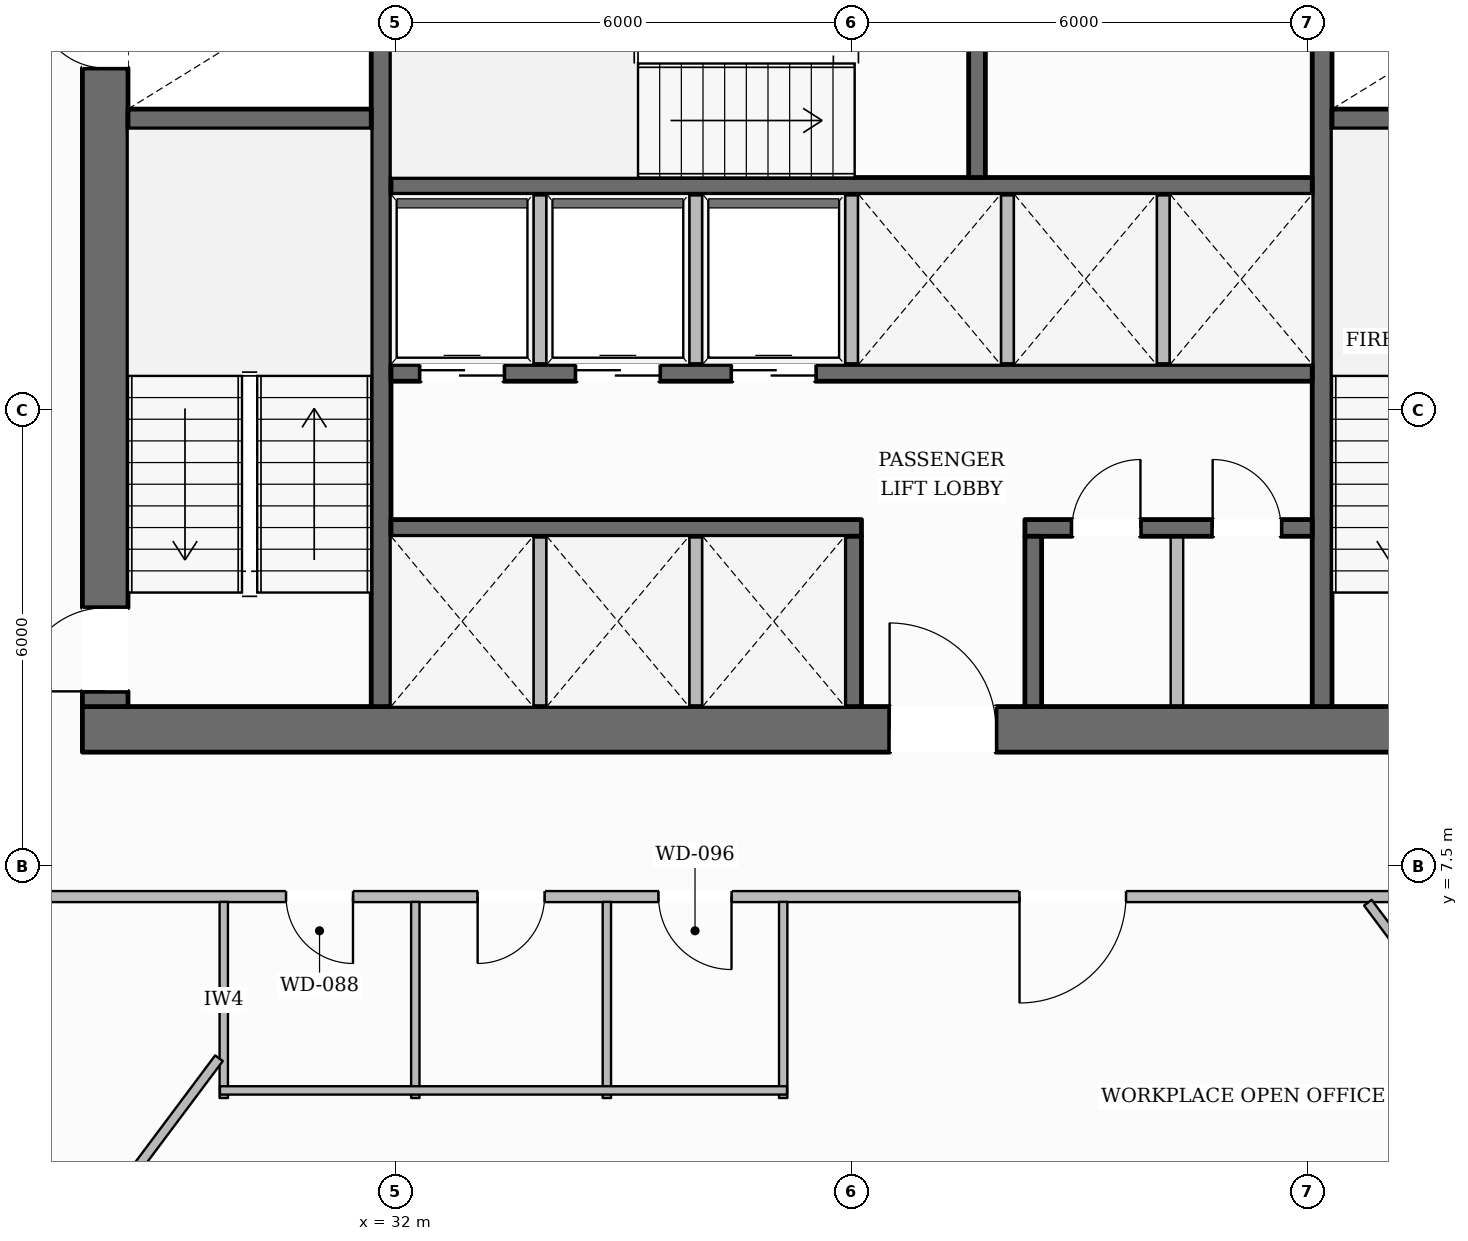
"""IFC4 building model, lengths in metres.
Left out: names, types, materials, properties, quantities, classifications, styles, units other than length and angle.
Written with IfcOpenShell. Run it as: python <this file> out.ifc"""

import sys

from ifc_helpers import new_model, si_unit, direction, frame, frame_2d, origin, place, context, subcontext, project, spatial, rectangle, extrude, element, fill, save


model = new_model("IFC4")
c1 = context("Model", 3, precision=1e-05, world=origin(), true_north=direction((0.0, 1.0)))
c2 = subcontext(c1, "Body", "Model", "MODEL_VIEW")
j1 = project(units=[si_unit("LENGTHUNIT", "METRE"), si_unit("PLANEANGLEUNIT", "RADIAN")], contexts=[c1])
p1 = place(None, origin())
s1 = spatial("IfcSite", under=j1, at=p1, CompositionType="ELEMENT")
p2 = place(p1, origin())
s2 = spatial("IfcBuilding", under=s1, at=p2, CompositionType="ELEMENT")
p3 = place(p2, frame((0.0, 0.0, 25.25)))
s3 = spatial("IfcBuildingStorey", under=s2, at=p3, CompositionType="ELEMENT", Elevation=25.25)
p4 = place(p3, frame((27.88, 9.3, 0.0), z_axis=(0.0, 0.0, 1.0), x_axis=(1.0, 0.0, 0.0)))
e1 = element("IfcWall", 1, at=p4, inside=s3, PredefinedType="SOLIDWALL", context=c2, shape_type="SweptSolid", body=[
    extrude(rectangle(XDim=20.24, YDim=0.6, at=frame_2d((10.12, 0.0))), origin(), (0.0, 0.0, 1.0), 3.59),
])
p5 = place(p4, frame((10.62, 0.0, 0.0)))
e2 = element("IfcOpeningElement", 2, at=p5, cuts=e1, PredefinedType="OPENING", context=c2, shape_type="SweptSolid", body=[
    extrude(rectangle(XDim=1.4, YDim=2.2, at=frame_2d((0.7, 1.1))), frame((0.0, 0.31, 0.0), z_axis=(0.0, -1.0, 0.0), x_axis=(1.0, 0.0, 0.0)), (0.0, 0.0, 1.0), 0.62),
])
p6 = place(p3, frame((28.18, 9.6, 0.0), z_axis=(0.0, 0.0, 1.0), x_axis=(0.0, 1.0, 0.0)))
e3 = element("IfcWall", 3, at=p6, inside=s3, PredefinedType="SOLIDWALL", context=c2, shape_type="SweptSolid", body=[
    extrude(rectangle(XDim=13.0, YDim=0.6, at=frame_2d((6.5, 0.0))), origin(), (0.0, 0.0, 1.0), 3.59),
])
p7 = place(p6, frame((0.2, 0.0, 0.0)))
e4 = element("IfcOpeningElement", 4, at=p7, cuts=e3, PredefinedType="OPENING", context=c2, shape_type="SweptSolid", body=[
    extrude(rectangle(XDim=1.1, YDim=2.15, at=frame_2d((0.55, 1.075))), frame((0.0, 0.31, 0.0), z_axis=(0.0, -1.0, 0.0), x_axis=(1.0, 0.0, 0.0)), (0.0, 0.0, 1.0), 0.62),
])
p8 = place(p6, frame((8.4, 0.0, 0.0)))
e5 = element("IfcOpeningElement", 5, at=p8, cuts=e3, PredefinedType="OPENING", context=c2, shape_type="SweptSolid", body=[
    extrude(rectangle(XDim=0.9, YDim=2.1, at=frame_2d((0.45, 1.05))), frame((0.0, 0.31, 0.0), z_axis=(0.0, -1.0, 0.0), x_axis=(1.0, 0.0, 0.0)), (0.0, 0.0, 1.0), 0.62),
])
p9 = place(p3, frame((31.81, 9.6, 0.0), z_axis=(0.0, 0.0, 1.0), x_axis=(0.0, 1.0, 0.0)))
e6 = element("IfcWall", 6, at=p9, inside=s3, PredefinedType="SHEAR", context=c2, shape_type="SweptSolid", body=[
    extrude(rectangle(XDim=13.0, YDim=0.26, at=frame_2d((6.5, 0.0))), origin(), (0.0, 0.0, 1.0), 3.59),
])
p10 = place(p9, frame((10.925, 0.0, 0.0)))
e7 = element("IfcOpeningElement", 7, at=p10, cuts=e6, PredefinedType="OPENING", context=c2, shape_type="SweptSolid", body=[
    extrude(rectangle(XDim=1.25, YDim=2.25, at=frame_2d((0.625, 1.125))), frame((0.0, 0.14, 0.0), z_axis=(0.0, -1.0, 0.0), x_axis=(1.0, 0.0, 0.0)), (0.0, 0.0, 1.0), 0.28),
])
p11 = place(p3, frame((44.19, 9.6, 0.0), z_axis=(0.0, 0.0, 1.0), x_axis=(0.0, 1.0, 0.0)))
e8 = element("IfcWall", 8, at=p11, inside=s3, PredefinedType="SHEAR", context=c2, shape_type="SweptSolid", body=[
    extrude(rectangle(XDim=13.0, YDim=0.26, at=frame_2d((6.5, 0.0))), origin(), (0.0, 0.0, 1.0), 3.59),
])
p12 = place(p11, frame((10.925, 0.0, 0.0)))
e9 = element("IfcOpeningElement", 9, at=p12, cuts=e8, PredefinedType="OPENING", context=c2, shape_type="SweptSolid", body=[
    extrude(rectangle(XDim=1.25, YDim=2.25, at=frame_2d((0.625, 1.125))), frame((0.0, 0.14, 0.0), z_axis=(0.0, -1.0, 0.0), x_axis=(1.0, 0.0, 0.0)), (0.0, 0.0, 1.0), 0.28),
])
for number, where, z_axis, x_axis in (
    (10, (28.48, 17.33, 0.0), (0.0, 0.0, 1.0), (1.0, 0.0, 0.0)),
    (11, (44.32, 17.33, 0.0), (0.0, 0.0, 1.0), (1.0, 0.0, 0.0)),
):
    element("IfcWall", number, at=place(p3, frame(where, z_axis=z_axis, x_axis=x_axis)), inside=s3, PredefinedType="SHEAR", context=c2, shape_type="SweptSolid", body=[
        extrude(rectangle(XDim=3.2, YDim=0.26, at=frame_2d((1.6, 0.0))), origin(), (0.0, 0.0, 1.0), 3.59),
    ])
p13 = place(p3, frame((31.94, 16.45, 0.0), z_axis=(0.0, 0.0, 1.0), x_axis=(1.0, 0.0, 0.0)))
e12 = element("IfcWall", 12, at=p13, inside=s3, PredefinedType="SOLIDWALL", context=c2, shape_type="SweptSolid", body=[
    extrude(rectangle(XDim=12.12, YDim=0.22, at=frame_2d((6.06, 0.0))), origin(), (0.0, 0.0, 1.0), 3.59),
])
p14 = place(p3, frame((39.65, 16.56, 0.0), z_axis=(0.0, 0.0, 1.0), x_axis=(0.0, 1.0, 0.0)))
e13 = element("IfcWall", 13, at=p14, inside=s3, PredefinedType="SOLIDWALL", context=c2, shape_type="SweptSolid", body=[
    extrude(rectangle(XDim=3.2, YDim=0.22, at=frame_2d((1.6, 0.0))), origin(), (0.0, 0.0, 1.0), 3.59),
])
p15 = place(p3, frame((31.94, 13.99, 0.0), z_axis=(0.0, 0.0, 1.0), x_axis=(1.0, 0.0, 0.0)))
e14 = element("IfcWall", 14, at=p15, inside=s3, PredefinedType="SOLIDWALL", context=c2, shape_type="SweptSolid", body=[
    extrude(rectangle(XDim=12.12, YDim=0.22, at=frame_2d((6.06, 0.0))), origin(), (0.0, 0.0, 1.0), 3.59),
])
p16 = place(p15, frame((0.385, 0.0, 0.0)))
e15 = element("IfcOpeningElement", 15, at=p16, cuts=e14, PredefinedType="OPENING", context=c2, shape_type="SweptSolid", body=[
    extrude(rectangle(XDim=1.1, YDim=2.2, at=frame_2d((0.55, 1.1))), frame((0.0, 0.12, 0.0), z_axis=(0.0, -1.0, 0.0), x_axis=(1.0, 0.0, 0.0)), (0.0, 0.0, 1.0), 0.24),
])
p17 = place(p15, frame((2.435, 0.0, 0.0)))
e16 = element("IfcOpeningElement", 16, at=p17, cuts=e14, PredefinedType="OPENING", context=c2, shape_type="SweptSolid", body=[
    extrude(rectangle(XDim=1.1, YDim=2.2, at=frame_2d((0.55, 1.1))), frame((0.0, 0.12, 0.0), z_axis=(0.0, -1.0, 0.0), x_axis=(1.0, 0.0, 0.0)), (0.0, 0.0, 1.0), 0.24),
])
p18 = place(p15, frame((4.485, 0.0, 0.0)))
e17 = element("IfcOpeningElement", 17, at=p18, cuts=e14, PredefinedType="OPENING", context=c2, shape_type="SweptSolid", body=[
    extrude(rectangle(XDim=1.1, YDim=2.2, at=frame_2d((0.55, 1.1))), frame((0.0, 0.12, 0.0), z_axis=(0.0, -1.0, 0.0), x_axis=(1.0, 0.0, 0.0)), (0.0, 0.0, 1.0), 0.24),
])
p19 = place(p3, frame((31.94, 11.95, 0.0), z_axis=(0.0, 0.0, 1.0), x_axis=(1.0, 0.0, 0.0)))
e18 = element("IfcWall", 18, at=p19, inside=s3, PredefinedType="SOLIDWALL", context=c2, shape_type="SweptSolid", body=[
    extrude(rectangle(XDim=6.19, YDim=0.22, at=frame_2d((3.095, 0.0))), origin(), (0.0, 0.0, 1.0), 3.59),
])
p20 = place(p3, frame((40.28, 11.95, 0.0), z_axis=(0.0, 0.0, 1.0), x_axis=(1.0, 0.0, 0.0)))
e19 = element("IfcWall", 19, at=p20, inside=s3, PredefinedType="SOLIDWALL", context=c2, shape_type="SweptSolid", body=[
    extrude(rectangle(XDim=3.78, YDim=0.22, at=frame_2d((1.89, 0.0))), origin(), (0.0, 0.0, 1.0), 3.59),
])
p21 = place(p20, frame((0.62, 0.0, 0.0)))
e20 = element("IfcOpeningElement", 20, at=p21, cuts=e19, PredefinedType="OPENING", context=c2, shape_type="SweptSolid", body=[
    extrude(rectangle(XDim=0.9, YDim=2.1, at=frame_2d((0.45, 1.05))), frame((0.0, 0.12, 0.0), z_axis=(0.0, -1.0, 0.0), x_axis=(1.0, 0.0, 0.0)), (0.0, 0.0, 1.0), 0.24),
])
p22 = place(p20, frame((2.47, 0.0, 0.0)))
e21 = element("IfcOpeningElement", 21, at=p22, cuts=e19, PredefinedType="OPENING", context=c2, shape_type="SweptSolid", body=[
    extrude(rectangle(XDim=0.9, YDim=2.1, at=frame_2d((0.45, 1.05))), frame((0.0, 0.12, 0.0), z_axis=(0.0, -1.0, 0.0), x_axis=(1.0, 0.0, 0.0)), (0.0, 0.0, 1.0), 0.24),
])
for number, where, z_axis, x_axis in (
    (22, (38.02, 9.6, 0.0), (0.0, 0.0, 1.0), (0.0, 1.0, 0.0)),
    (23, (40.39, 9.6, 0.0), (0.0, 0.0, 1.0), (0.0, 1.0, 0.0)),
):
    element("IfcWall", number, at=place(p3, frame(where, z_axis=z_axis, x_axis=x_axis)), inside=s3, PredefinedType="SOLIDWALL", context=c2, shape_type="SweptSolid", body=[
        extrude(rectangle(XDim=2.24, YDim=0.22, at=frame_2d((1.12, 0.0))), origin(), (0.0, 0.0, 1.0), 3.59),
    ])
p23 = place(p3, frame((13.263, 14.928, 0.0), z_axis=(0.0, 0.0, 1.0), x_axis=(0.495711630902, 0.868487178367, 0.0)))
e24 = element("IfcWall", 24, at=p23, inside=s3, PredefinedType="STANDARD", context=c2, shape_type="SweptSolid", body=[
    extrude(rectangle(XDim=34.092, YDim=0.38, at=frame_2d((17.046, 0.0))), origin(), (0.0, 0.0, 1.0), 2.97),
])
p24 = place(p23, frame((30.027, 0.0, 0.65)))
e25 = element("IfcOpeningElement", 25, at=p24, cuts=e24, PredefinedType="OPENING", context=c2, shape_type="SweptSolid", body=[
    extrude(rectangle(XDim=1.65, YDim=1.75, at=frame_2d((0.825, 0.875))), frame((0.0, 0.2, 0.0), z_axis=(0.0, -1.0, 0.0), x_axis=(1.0, 0.0, 0.0)), (0.0, 0.0, 1.0), 0.4),
])
p25 = place(p23, frame((24.504, 0.0, 0.65)))
e26 = element("IfcOpeningElement", 26, at=p25, cuts=e24, PredefinedType="OPENING", context=c2, shape_type="SweptSolid", body=[
    extrude(rectangle(XDim=1.65, YDim=1.75, at=frame_2d((0.825, 0.875))), frame((0.0, 0.2, 0.0), z_axis=(0.0, -1.0, 0.0), x_axis=(1.0, 0.0, 0.0)), (0.0, 0.0, 1.0), 0.4),
])
p26 = place(p23, frame((13.457, 0.0, 0.65)))
e27 = element("IfcOpeningElement", 27, at=p26, cuts=e24, PredefinedType="OPENING", context=c2, shape_type="SweptSolid", body=[
    extrude(rectangle(XDim=1.65, YDim=1.75, at=frame_2d((0.825, 0.875))), frame((0.0, 0.2, 0.0), z_axis=(0.0, -1.0, 0.0), x_axis=(1.0, 0.0, 0.0)), (0.0, 0.0, 1.0), 0.4),
])
p27 = place(p23, frame((7.934, 0.0, 0.65)))
e28 = element("IfcOpeningElement", 28, at=p27, cuts=e24, PredefinedType="OPENING", context=c2, shape_type="SweptSolid", body=[
    extrude(rectangle(XDim=1.65, YDim=1.75, at=frame_2d((0.825, 0.875))), frame((0.0, 0.2, 0.0), z_axis=(0.0, -1.0, 0.0), x_axis=(1.0, 0.0, 0.0)), (0.0, 0.0, 1.0), 0.4),
])
p28 = place(p23, frame((2.411, 0.0, 0.65)))
e29 = element("IfcOpeningElement", 29, at=p28, cuts=e24, PredefinedType="OPENING", context=c2, shape_type="SweptSolid", body=[
    extrude(rectangle(XDim=1.65, YDim=1.75, at=frame_2d((0.825, 0.875))), frame((0.0, 0.2, 0.0), z_axis=(0.0, -1.0, 0.0), x_axis=(1.0, 0.0, 0.0)), (0.0, 0.0, 1.0), 0.4),
])
for number, where, z_axis, x_axis in (
    (30, (33.9, 9.6, 0.0), (0.0, 0.0, 1.0), (0.0, 1.0, 0.0)),
    (31, (35.95, 9.6, 0.0), (0.0, 0.0, 1.0), (0.0, 1.0, 0.0)),
    (32, (33.9, 14.1, 0.0), (0.0, 0.0, 1.0), (0.0, 1.0, 0.0)),
    (33, (35.95, 14.1, 0.0), (0.0, 0.0, 1.0), (0.0, 1.0, 0.0)),
    (34, (38.0, 14.1, 0.0), (0.0, 0.0, 1.0), (0.0, 1.0, 0.0)),
    (35, (40.05, 14.1, 0.0), (0.0, 0.0, 1.0), (0.0, 1.0, 0.0)),
    (36, (42.1, 14.1, 0.0), (0.0, 0.0, 1.0), (0.0, 1.0, 0.0)),
    (37, (42.28, 9.6, 0.0), (0.0, 0.0, 1.0), (0.0, 1.0, 0.0)),
):
    element("IfcWall", number, at=place(p3, frame(where, z_axis=z_axis, x_axis=x_axis)), inside=s3, PredefinedType="PARTITIONING", context=c2, shape_type="SweptSolid", body=[
        extrude(rectangle(XDim=2.24, YDim=0.165, at=frame_2d((1.12, 0.0))), origin(), (0.0, 0.0, 1.0), 3.59),
    ])
p29 = place(p3, frame((49.92, 7.1, 0.0), z_axis=(0.0, 0.0, 1.0), x_axis=(-1.0, 0.0, 0.0)))
e38 = element("IfcWall", 38, at=p29, inside=s3, PredefinedType="PARTITIONING", context=c2, shape_type="SweptSolid", body=[
    extrude(rectangle(XDim=23.84, YDim=0.145, at=frame_2d((11.92, 0.0))), origin(), (0.0, 0.0, 1.0), 3.278),
])
p30 = place(p29, frame((18.48, 0.0, 0.0)))
e39 = element("IfcOpeningElement", 39, at=p30, cuts=e38, PredefinedType="OPENING", context=c2, shape_type="SweptSolid", body=[
    extrude(rectangle(XDim=0.88, YDim=2.1, at=frame_2d((0.44, 1.05))), frame((0.0, 0.083, 0.0), z_axis=(0.0, -1.0, 0.0), x_axis=(1.0, 0.0, 0.0)), (0.0, 0.0, 1.0), 0.165),
])
p31 = place(p29, frame((15.96, 0.0, 0.0)))
e40 = element("IfcOpeningElement", 40, at=p31, cuts=e38, PredefinedType="OPENING", context=c2, shape_type="SweptSolid", body=[
    extrude(rectangle(XDim=0.88, YDim=2.1, at=frame_2d((0.44, 1.05))), frame((0.0, 0.083, 0.0), z_axis=(0.0, -1.0, 0.0), x_axis=(1.0, 0.0, 0.0)), (0.0, 0.0, 1.0), 0.165),
])
p32 = place(p29, frame((13.5, 0.0, 0.0)))
e41 = element("IfcOpeningElement", 41, at=p32, cuts=e38, PredefinedType="OPENING", context=c2, shape_type="SweptSolid", body=[
    extrude(rectangle(XDim=0.96, YDim=2.1, at=frame_2d((0.48, 1.05))), frame((0.0, 0.083, 0.0), z_axis=(0.0, -1.0, 0.0), x_axis=(1.0, 0.0, 0.0)), (0.0, 0.0, 1.0), 0.165),
])
p33 = place(p29, frame((8.311, 0.0, 0.0)))
e42 = element("IfcOpeningElement", 42, at=p33, cuts=e38, PredefinedType="OPENING", context=c2, shape_type="SweptSolid", body=[
    extrude(rectangle(XDim=1.4, YDim=2.2, at=frame_2d((0.7, 1.1))), frame((0.0, 0.083, 0.0), z_axis=(0.0, -1.0, 0.0), x_axis=(1.0, 0.0, 0.0)), (0.0, 0.0, 1.0), 0.165),
])
for number, where, z_axis, x_axis in (
    (43, (29.74, 4.45, 0.0), (0.0, 0.0, 1.0), (0.0, 1.0, 0.0)),
    (44, (32.26, 4.45, 0.0), (0.0, 0.0, 1.0), (0.0, 1.0, 0.0)),
    (45, (34.78, 4.45, 0.0), (0.0, 0.0, 1.0), (0.0, 1.0, 0.0)),
    (46, (37.1, 4.45, 0.0), (0.0, 0.0, 1.0), (0.0, 1.0, 0.0)),
):
    element("IfcWall", number, at=place(p3, frame(where, z_axis=z_axis, x_axis=x_axis)), inside=s3, PredefinedType="PLUMBINGWALL", context=c2, shape_type="SweptSolid", body=[
        extrude(rectangle(XDim=2.58, YDim=0.11, at=frame_2d((1.29, 0.0))), origin(), (0.0, 0.0, 1.0), 3.59),
    ])
p34 = place(p3, frame((29.69, 4.55, 0.0), z_axis=(0.0, 0.0, 1.0), x_axis=(1.0, 0.0, 0.0)))
e47 = element("IfcWall", 47, at=p34, inside=s3, PredefinedType="PLUMBINGWALL", context=c2, shape_type="SweptSolid", body=[
    extrude(rectangle(XDim=7.46, YDim=0.11, at=frame_2d((3.73, 0.0))), origin(), (0.0, 0.0, 1.0), 3.59),
])
p35 = place(p3, frame((29.677, 4.973, 0.0), z_axis=(0.0, 0.0, 1.0), x_axis=(-0.598981151393, -0.800763123699, 0.0)))
e48 = element("IfcWall", 48, at=p35, inside=s3, PredefinedType="PARTITIONING", context=c2, shape_type="SweptSolid", body=[
    extrude(rectangle(XDim=3.874, YDim=0.125, at=frame_2d((1.937, 0.0))), origin(), (0.0, 0.0, 1.0), 3.59),
])
p36 = place(p3, frame((44.792, 7.02, 0.0), z_axis=(0.0, 0.0, 1.0), x_axis=(0.598984945208, -0.800760285863, 0.0)))
e49 = element("IfcWall", 49, at=p36, inside=s3, PredefinedType="PARTITIONING", context=c2, shape_type="SweptSolid", body=[
    extrude(rectangle(XDim=6.43, YDim=0.125, at=frame_2d((3.215, 0.0))), origin(), (0.0, 0.0, 1.0), 3.59),
])
p37 = place(p7, origin())
e50 = element("IfcDoor", 50, at=p37, inside=s3, OperationType="SINGLE_SWING_LEFT", PredefinedType="DOOR", context=c2, shape_type="SweptSolid", body=[
    extrude(rectangle(XDim=1.1, YDim=2.15, at=frame_2d((0.55, 1.075))), frame((0.0, 0.025, 0.0), z_axis=(0.0, -1.0, 0.0), x_axis=(1.0, 0.0, 0.0)), (0.0, 0.0, 1.0), 0.05),
])
fill(e4, e50)
p38 = place(p8, origin())
e51 = element("IfcDoor", 51, at=p38, inside=s3, OperationType="SINGLE_SWING_RIGHT", PredefinedType="DOOR", context=c2, shape_type="SweptSolid", body=[
    extrude(rectangle(XDim=0.9, YDim=2.1, at=frame_2d((0.45, 1.05))), frame((0.0, 0.025, 0.0), z_axis=(0.0, -1.0, 0.0), x_axis=(1.0, 0.0, 0.0)), (0.0, 0.0, 1.0), 0.05),
])
fill(e5, e51)
p39 = place(p5, origin())
e52 = element("IfcDoor", 52, at=p39, inside=s3, OperationType="SINGLE_SWING_LEFT", PredefinedType="DOOR", context=c2, shape_type="SweptSolid", body=[
    extrude(rectangle(XDim=1.4, YDim=2.2, at=frame_2d((0.7, 1.1))), frame((0.0, 0.025, 0.0), z_axis=(0.0, -1.0, 0.0), x_axis=(1.0, 0.0, 0.0)), (0.0, 0.0, 1.0), 0.05),
])
fill(e2, e52)
p40 = place(p16, origin())
e53 = element("IfcDoor", 53, at=p40, inside=s3, OperationType="DOUBLE_DOOR_SLIDING", PredefinedType="DOOR", context=c2, shape_type="SweptSolid", body=[
    extrude(rectangle(XDim=1.1, YDim=2.2, at=frame_2d((0.55, 1.1))), frame((0.0, 0.025, 0.0), z_axis=(0.0, -1.0, 0.0), x_axis=(1.0, 0.0, 0.0)), (0.0, 0.0, 1.0), 0.05),
])
fill(e15, e53)
p41 = place(p17, origin())
e54 = element("IfcDoor", 54, at=p41, inside=s3, OperationType="DOUBLE_DOOR_SLIDING", PredefinedType="DOOR", context=c2, shape_type="SweptSolid", body=[
    extrude(rectangle(XDim=1.1, YDim=2.2, at=frame_2d((0.55, 1.1))), frame((0.0, 0.025, 0.0), z_axis=(0.0, -1.0, 0.0), x_axis=(1.0, 0.0, 0.0)), (0.0, 0.0, 1.0), 0.05),
])
fill(e16, e54)
p42 = place(p18, origin())
e55 = element("IfcDoor", 55, at=p42, inside=s3, OperationType="DOUBLE_DOOR_SLIDING", PredefinedType="DOOR", context=c2, shape_type="SweptSolid", body=[
    extrude(rectangle(XDim=1.1, YDim=2.2, at=frame_2d((0.55, 1.1))), frame((0.0, 0.025, 0.0), z_axis=(0.0, -1.0, 0.0), x_axis=(1.0, 0.0, 0.0)), (0.0, 0.0, 1.0), 0.05),
])
fill(e17, e55)
p43 = place(p21, origin())
e56 = element("IfcDoor", 56, at=p43, inside=s3, OperationType="SINGLE_SWING_RIGHT", PredefinedType="DOOR", context=c2, shape_type="SweptSolid", body=[
    extrude(rectangle(XDim=0.9, YDim=2.1, at=frame_2d((0.45, 1.05))), frame((0.0, 0.025, 0.0), z_axis=(0.0, -1.0, 0.0), x_axis=(1.0, 0.0, 0.0)), (0.0, 0.0, 1.0), 0.05),
])
fill(e20, e56)
p44 = place(p22, origin())
e57 = element("IfcDoor", 57, at=p44, inside=s3, OperationType="SINGLE_SWING_LEFT", PredefinedType="DOOR", context=c2, shape_type="SweptSolid", body=[
    extrude(rectangle(XDim=0.9, YDim=2.1, at=frame_2d((0.45, 1.05))), frame((0.0, 0.025, 0.0), z_axis=(0.0, -1.0, 0.0), x_axis=(1.0, 0.0, 0.0)), (0.0, 0.0, 1.0), 0.05),
])
fill(e21, e57)
p45 = place(p30, origin())
e58 = element("IfcDoor", 58, at=p45, inside=s3, OperationType="SINGLE_SWING_LEFT", PredefinedType="DOOR", context=c2, shape_type="SweptSolid", body=[
    extrude(rectangle(XDim=0.88, YDim=2.1, at=frame_2d((0.44, 1.05))), frame((0.0, 0.025, 0.0), z_axis=(0.0, -1.0, 0.0), x_axis=(1.0, 0.0, 0.0)), (0.0, 0.0, 1.0), 0.05),
])
fill(e39, e58)
p46 = place(p31, origin())
e59 = element("IfcDoor", 59, at=p46, inside=s3, OperationType="SINGLE_SWING_RIGHT", PredefinedType="DOOR", context=c2, shape_type="SweptSolid", body=[
    extrude(rectangle(XDim=0.88, YDim=2.1, at=frame_2d((0.44, 1.05))), frame((0.0, 0.025, 0.0), z_axis=(0.0, -1.0, 0.0), x_axis=(1.0, 0.0, 0.0)), (0.0, 0.0, 1.0), 0.05),
])
fill(e40, e59)
p47 = place(p32, origin())
e60 = element("IfcDoor", 60, at=p47, inside=s3, OperationType="SINGLE_SWING_LEFT", PredefinedType="DOOR", context=c2, shape_type="SweptSolid", body=[
    extrude(rectangle(XDim=0.96, YDim=2.1, at=frame_2d((0.48, 1.05))), frame((0.0, 0.025, 0.0), z_axis=(0.0, -1.0, 0.0), x_axis=(1.0, 0.0, 0.0)), (0.0, 0.0, 1.0), 0.05),
])
fill(e41, e60)
p48 = place(p33, origin())
e61 = element("IfcDoor", 61, at=p48, inside=s3, OperationType="SINGLE_SWING_RIGHT", PredefinedType="DOOR", context=c2, shape_type="SweptSolid", body=[
    extrude(rectangle(XDim=1.4, YDim=2.2, at=frame_2d((0.7, 1.1))), frame((0.0, 0.025, 0.0), z_axis=(0.0, -1.0, 0.0), x_axis=(1.0, 0.0, 0.0)), (0.0, 0.0, 1.0), 0.05),
])
fill(e42, e61)
save(model, sys.argv[1])
